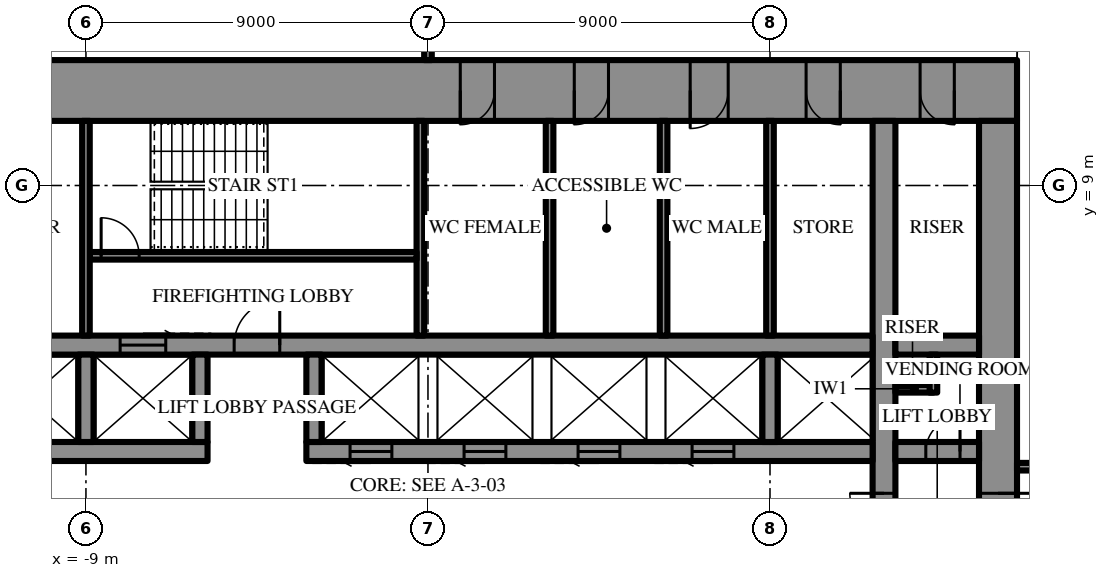
"""IFC4 building model, lengths in metres.
Left out: names, types, materials, properties, quantities, classifications, styles, units other than length and angle.
Written with IfcOpenShell. Run it as: python <this file> out.ifc"""

import sys

from ifc_helpers import new_model, si_unit, direction, frame, frame_2d, origin, place, context, subcontext, project, spatial, rectangle, extrude, element, fill, save


model = new_model("IFC4")
c1 = context("Model", 3, precision=1e-05, world=origin(), true_north=direction((0.0, 1.0)))
c2 = subcontext(c1, "Body", "Model", "MODEL_VIEW")
j1 = project(units=[si_unit("LENGTHUNIT", "METRE"), si_unit("PLANEANGLEUNIT", "RADIAN")], contexts=[c1])
p1 = place(None, origin())
s1 = spatial("IfcSite", under=j1, at=p1, CompositionType="ELEMENT")
p2 = place(p1, origin())
s2 = spatial("IfcBuilding", under=s1, at=p2, CompositionType="ELEMENT")
p3 = place(p2, frame((0.0, 0.0, 228.1)))
s3 = spatial("IfcBuildingStorey", under=s2, at=p3, CompositionType="ELEMENT", Elevation=228.1)
p4 = place(p3, frame((-15.5, 11.5, 0.0), z_axis=(0.0, 0.0, 1.0), x_axis=(1.0, 0.0, 0.0)))
e1 = element("IfcWall", 1, at=p4, inside=s3, PredefinedType="SHEAR", context=c2, shape_type="SweptSolid", body=[
    extrude(rectangle(XDim=31.0, YDim=1.6, at=frame_2d((15.5, 0.0))), origin(), (0.0, 0.0, 1.0), 4.2),
])
p5 = place(p4, frame((16.35, 0.0, 0.0)))
e2 = element("IfcOpeningElement", 2, at=p5, cuts=e1, PredefinedType="OPENING", context=c2, shape_type="SweptSolid", body=[
    extrude(rectangle(XDim=0.9, YDim=2.2, at=frame_2d((0.45, 1.1))), frame((0.0, 0.81, 0.0), z_axis=(0.0, -1.0, 0.0), x_axis=(1.0, 0.0, 0.0)), (0.0, 0.0, 1.0), 1.62),
])
p6 = place(p4, frame((19.35, 0.0, 0.0)))
e3 = element("IfcOpeningElement", 3, at=p6, cuts=e1, PredefinedType="OPENING", context=c2, shape_type="SweptSolid", body=[
    extrude(rectangle(XDim=0.9, YDim=2.2, at=frame_2d((0.45, 1.1))), frame((0.0, 0.81, 0.0), z_axis=(0.0, -1.0, 0.0), x_axis=(1.0, 0.0, 0.0)), (0.0, 0.0, 1.0), 1.62),
])
p7 = place(p4, frame((22.4, 0.0, 0.0)))
e4 = element("IfcOpeningElement", 4, at=p7, cuts=e1, PredefinedType="OPENING", context=c2, shape_type="SweptSolid", body=[
    extrude(rectangle(XDim=1.0, YDim=2.2, at=frame_2d((0.5, 1.1))), frame((0.0, 0.81, 0.0), z_axis=(0.0, -1.0, 0.0), x_axis=(1.0, 0.0, 0.0)), (0.0, 0.0, 1.0), 1.62),
])
p8 = place(p4, frame((1.65, 0.0, 0.0)))
e5 = element("IfcOpeningElement", 5, at=p8, cuts=e1, PredefinedType="OPENING", context=c2, shape_type="SweptSolid", body=[
    extrude(rectangle(XDim=0.9, YDim=2.2, at=frame_2d((0.45, 1.1))), frame((0.0, 0.81, 0.0), z_axis=(0.0, -1.0, 0.0), x_axis=(1.0, 0.0, 0.0)), (0.0, 0.0, 1.0), 1.62),
])
p9 = place(p4, frame((4.65, 0.0, 0.0)))
e6 = element("IfcOpeningElement", 6, at=p9, cuts=e1, PredefinedType="OPENING", context=c2, shape_type="SweptSolid", body=[
    extrude(rectangle(XDim=0.9, YDim=2.2, at=frame_2d((0.45, 1.1))), frame((0.0, 0.81, 0.0), z_axis=(0.0, -1.0, 0.0), x_axis=(1.0, 0.0, 0.0)), (0.0, 0.0, 1.0), 1.62),
])
p10 = place(p4, frame((25.45, 0.0, 0.0)))
e7 = element("IfcOpeningElement", 7, at=p10, cuts=e1, PredefinedType="OPENING", context=c2, shape_type="SweptSolid", body=[
    extrude(rectangle(XDim=0.9, YDim=2.2, at=frame_2d((0.45, 1.1))), frame((0.0, 0.81, 0.0), z_axis=(0.0, -1.0, 0.0), x_axis=(1.0, 0.0, 0.0)), (0.0, 0.0, 1.0), 1.62),
])
p11 = place(p4, frame((28.45, 0.0, 0.0)))
e8 = element("IfcOpeningElement", 8, at=p11, cuts=e1, PredefinedType="OPENING", context=c2, shape_type="SweptSolid", body=[
    extrude(rectangle(XDim=0.9, YDim=2.2, at=frame_2d((0.45, 1.1))), frame((0.0, 0.81, 0.0), z_axis=(0.0, -1.0, 0.0), x_axis=(1.0, 0.0, 0.0)), (0.0, 0.0, 1.0), 1.62),
])
p12 = place(p3, frame((15.0, -10.7, 0.0), z_axis=(0.0, 0.0, 1.0), x_axis=(0.0, 1.0, 0.0)))
e9 = element("IfcWall", 9, at=p12, inside=s3, PredefinedType="SHEAR", context=c2, shape_type="SweptSolid", body=[
    extrude(rectangle(XDim=21.4, YDim=1.0, at=frame_2d((10.7, 0.0))), origin(), (0.0, 0.0, 1.0), 4.2),
])
p13 = place(p12, frame((9.8, 0.0, 0.0)))
e10 = element("IfcOpeningElement", 10, at=p13, cuts=e9, PredefinedType="OPENING", context=c2, shape_type="SweptSolid", body=[
    extrude(rectangle(XDim=1.8, YDim=2.4, at=frame_2d((0.9, 1.2))), frame((0.0, 0.51, 0.0), z_axis=(0.0, -1.0, 0.0), x_axis=(1.0, 0.0, 0.0)), (0.0, 0.0, 1.0), 1.02),
])
p14 = place(p3, frame((12.0, -10.7, 0.0), z_axis=(0.0, 0.0, 1.0), x_axis=(0.0, 1.0, 0.0)))
e11 = element("IfcWall", 11, at=p14, inside=s3, PredefinedType="SHEAR", context=c2, shape_type="SweptSolid", body=[
    extrude(rectangle(XDim=21.4, YDim=0.6, at=frame_2d((10.7, 0.0))), origin(), (0.0, 0.0, 1.0), 4.2),
])
p15 = place(p14, frame((9.8, 0.0, 0.0)))
e12 = element("IfcOpeningElement", 12, at=p15, cuts=e11, PredefinedType="OPENING", context=c2, shape_type="SweptSolid", body=[
    extrude(rectangle(XDim=1.8, YDim=2.4, at=frame_2d((0.9, 1.2))), frame((0.0, 0.31, 0.0), z_axis=(0.0, -1.0, 0.0), x_axis=(1.0, 0.0, 0.0)), (0.0, 0.0, 1.0), 0.62),
])
p16 = place(p3, frame((-11.7, 2.0, 0.0), z_axis=(0.0, 0.0, 1.0), x_axis=(1.0, 0.0, 0.0)))
e13 = element("IfcWall", 13, at=p16, inside=s3, PredefinedType="SHEAR", context=c2, shape_type="SweptSolid", body=[
    extrude(rectangle(XDim=5.9, YDim=0.5, at=frame_2d((2.95, 0.0))), origin(), (0.0, 0.0, 1.0), 4.2),
])
p17 = place(p3, frame((-3.2, 2.0, 0.0), z_axis=(0.0, 0.0, 1.0), x_axis=(1.0, 0.0, 0.0)))
e14 = element("IfcWall", 14, at=p17, inside=s3, PredefinedType="SHEAR", context=c2, shape_type="SweptSolid", body=[
    extrude(rectangle(XDim=14.9, YDim=0.5, at=frame_2d((7.45, 0.0))), origin(), (0.0, 0.0, 1.0), 4.2),
])
p18 = place(p17, frame((1.15, 0.0, 0.0)))
e15 = element("IfcOpeningElement", 15, at=p18, cuts=e14, PredefinedType="OPENING", context=c2, shape_type="SweptSolid", body=[
    extrude(rectangle(XDim=1.1, YDim=2.2, at=frame_2d((0.55, 1.1))), frame((0.0, 0.26, 0.0), z_axis=(0.0, -1.0, 0.0), x_axis=(1.0, 0.0, 0.0)), (0.0, 0.0, 1.0), 0.52),
])
p19 = place(p17, frame((4.15, 0.0, 0.0)))
e16 = element("IfcOpeningElement", 16, at=p19, cuts=e14, PredefinedType="OPENING", context=c2, shape_type="SweptSolid", body=[
    extrude(rectangle(XDim=1.1, YDim=2.2, at=frame_2d((0.55, 1.1))), frame((0.0, 0.26, 0.0), z_axis=(0.0, -1.0, 0.0), x_axis=(1.0, 0.0, 0.0)), (0.0, 0.0, 1.0), 0.52),
])
p20 = place(p17, frame((7.15, 0.0, 0.0)))
e17 = element("IfcOpeningElement", 17, at=p20, cuts=e14, PredefinedType="OPENING", context=c2, shape_type="SweptSolid", body=[
    extrude(rectangle(XDim=1.1, YDim=2.2, at=frame_2d((0.55, 1.1))), frame((0.0, 0.26, 0.0), z_axis=(0.0, -1.0, 0.0), x_axis=(1.0, 0.0, 0.0)), (0.0, 0.0, 1.0), 0.52),
])
p21 = place(p17, frame((10.15, 0.0, 0.0)))
e18 = element("IfcOpeningElement", 18, at=p21, cuts=e14, PredefinedType="OPENING", context=c2, shape_type="SweptSolid", body=[
    extrude(rectangle(XDim=1.1, YDim=2.2, at=frame_2d((0.55, 1.1))), frame((0.0, 0.26, 0.0), z_axis=(0.0, -1.0, 0.0), x_axis=(1.0, 0.0, 0.0)), (0.0, 0.0, 1.0), 0.52),
])
p22 = place(p3, frame((12.3, 2.0, 0.0), z_axis=(0.0, 0.0, 1.0), x_axis=(1.0, 0.0, 0.0)))
e19 = element("IfcWall", 19, at=p22, inside=s3, PredefinedType="SHEAR", context=c2, shape_type="SweptSolid", body=[
    extrude(rectangle(XDim=2.2, YDim=0.5, at=frame_2d((1.1, 0.0))), origin(), (0.0, 0.0, 1.0), 4.2),
])
p23 = place(p22, frame((0.8, 0.0, 0.0)))
e20 = element("IfcOpeningElement", 20, at=p23, cuts=e19, PredefinedType="OPENING", context=c2, shape_type="SweptSolid", body=[
    extrude(rectangle(XDim=0.9, YDim=2.2, at=frame_2d((0.45, 1.1))), frame((0.0, 0.26, 0.0), z_axis=(0.0, -1.0, 0.0), x_axis=(1.0, 0.0, 0.0)), (0.0, 0.0, 1.0), 0.52),
])
p24 = place(p3, frame((-11.7, 4.8, 0.0), z_axis=(0.0, 0.0, 1.0), x_axis=(1.0, 0.0, 0.0)))
e21 = element("IfcWall", 21, at=p24, inside=s3, PredefinedType="SHEAR", context=c2, shape_type="SweptSolid", body=[
    extrude(rectangle(XDim=23.4, YDim=0.5, at=frame_2d((11.7, 0.0))), origin(), (0.0, 0.0, 1.0), 4.2),
])
p25 = place(p24, frame((6.6, 0.0, 0.0)))
e22 = element("IfcOpeningElement", 22, at=p25, cuts=e21, PredefinedType="OPENING", context=c2, shape_type="SweptSolid", body=[
    extrude(rectangle(XDim=1.2, YDim=2.2, at=frame_2d((0.6, 1.1))), frame((0.0, 0.26, 0.0), z_axis=(0.0, -1.0, 0.0), x_axis=(1.0, 0.0, 0.0)), (0.0, 0.0, 1.0), 0.52),
])
p26 = place(p24, frame((3.6, 0.0, 0.0)))
e23 = element("IfcOpeningElement", 23, at=p26, cuts=e21, PredefinedType="OPENING", context=c2, shape_type="SweptSolid", body=[
    extrude(rectangle(XDim=1.2, YDim=2.2, at=frame_2d((0.6, 1.1))), frame((0.0, 0.26, 0.0), z_axis=(0.0, -1.0, 0.0), x_axis=(1.0, 0.0, 0.0)), (0.0, 0.0, 1.0), 0.52),
])
p27 = place(p3, frame((12.3, 4.8, 0.0), z_axis=(0.0, 0.0, 1.0), x_axis=(1.0, 0.0, 0.0)))
e24 = element("IfcWall", 24, at=p27, inside=s3, PredefinedType="SHEAR", context=c2, shape_type="SweptSolid", body=[
    extrude(rectangle(XDim=2.2, YDim=0.5, at=frame_2d((1.1, 0.0))), origin(), (0.0, 0.0, 1.0), 4.2),
])
for number, where, z_axis, x_axis in (
    (25, (-9.0, 2.25, 0.0), (0.0, 0.0, 1.0), (0.0, 1.0, 0.0)),
    (26, (-6.0, 2.25, 0.0), (0.0, 0.0, 1.0), (0.0, 1.0, 0.0)),
    (27, (-3.0, 2.25, 0.0), (0.0, 0.0, 1.0), (0.0, 1.0, 0.0)),
    (28, (9.0, 2.25, 0.0), (0.0, 0.0, 1.0), (0.0, 1.0, 0.0)),
):
    element("IfcWall", number, at=place(p3, frame(where, z_axis=z_axis, x_axis=x_axis)), inside=s3, PredefinedType="SHEAR", context=c2, shape_type="SweptSolid", body=[
        extrude(rectangle(XDim=2.3, YDim=0.4, at=frame_2d((1.15, 0.0))), origin(), (0.0, 0.0, 1.0), 4.2),
    ])
p28 = place(p3, frame((-0.2, 5.05, 0.0), z_axis=(0.0, 0.0, 1.0), x_axis=(0.0, 1.0, 0.0)))
e29 = element("IfcWall", 29, at=p28, inside=s3, PredefinedType="SHEAR", context=c2, shape_type="SweptSolid", body=[
    extrude(rectangle(XDim=5.65, YDim=0.2, at=frame_2d((2.825, 0.0))), origin(), (0.0, 0.0, 1.0), 4.2),
])
p29 = place(p3, frame((-8.9, 7.15, 0.0), z_axis=(0.0, 0.0, 1.0), x_axis=(1.0, 0.0, 0.0)))
e30 = element("IfcWall", 30, at=p29, inside=s3, PredefinedType="SHEAR", context=c2, shape_type="SweptSolid", body=[
    extrude(rectangle(XDim=8.6, YDim=0.2, at=frame_2d((4.3, 0.0))), origin(), (0.0, 0.0, 1.0), 4.2),
])
p30 = place(p29, frame((0.3, 0.0, 0.0)))
e31 = element("IfcOpeningElement", 31, at=p30, cuts=e30, PredefinedType="OPENING", context=c2, shape_type="SweptSolid", body=[
    extrude(rectangle(XDim=1.0, YDim=2.2, at=frame_2d((0.5, 1.1))), frame((0.0, 0.11, 0.0), z_axis=(0.0, -1.0, 0.0), x_axis=(1.0, 0.0, 0.0)), (0.0, 0.0, 1.0), 0.22),
])
for number, where, z_axis, x_axis in (
    (32, (-9.0, 5.05, 0.0), (0.0, 0.0, 1.0), (0.0, 1.0, 0.0)),
    (33, (9.0, 5.05, 0.0), (0.0, 0.0, 1.0), (0.0, 1.0, 0.0)),
    (34, (3.2, 5.05, 0.0), (0.0, 0.0, 1.0), (0.0, 1.0, 0.0)),
    (35, (6.2, 5.05, 0.0), (0.0, 0.0, 1.0), (0.0, 1.0, 0.0)),
):
    element("IfcWall", number, at=place(p3, frame(where, z_axis=z_axis, x_axis=x_axis)), inside=s3, PredefinedType="PARTITIONING", context=c2, shape_type="SweptSolid", body=[
        extrude(rectangle(XDim=5.65, YDim=0.2, at=frame_2d((2.825, 0.0))), origin(), (0.0, 0.0, 1.0), 4.0),
    ])
for number, where, z_axis, x_axis in (
    (36, (12.3, 3.65, 0.0), (0.0, 0.0, 1.0), (1.0, 0.0, 0.0)),
    (37, (13.3, 3.55, 0.0), (0.0, 0.0, 1.0), (0.0, 1.0, 0.0)),
):
    element("IfcWall", number, at=place(p3, frame(where, z_axis=z_axis, x_axis=x_axis)), inside=s3, PredefinedType="PARTITIONING", context=c2, shape_type="SweptSolid", body=[
        extrude(rectangle(XDim=1.0, YDim=0.2, at=frame_2d((0.5, 0.0))), origin(), (0.0, 0.0, 1.0), 4.0),
    ])
p31 = place(p3, frame((15.5, 1.6, 0.0), z_axis=(0.0, 0.0, 1.0), x_axis=(1.0, 0.0, 0.0)))
e38 = element("IfcWall", 38, at=p31, inside=s3, PredefinedType="PARTITIONING", context=c2, shape_type="SweptSolid", body=[
    extrude(rectangle(XDim=2.3, YDim=0.2, at=frame_2d((1.15, 0.0))), origin(), (0.0, 0.0, 1.0), 4.0),
])
p32 = place(p3, frame((0.0, 12.3, 0.0), z_axis=(0.0, 0.0, 1.0), x_axis=(0.0, 1.0, 0.0)))
e39 = element("IfcWall", 39, at=p32, inside=s3, PredefinedType="PARTITIONING", context=c2, shape_type="SweptSolid", body=[
    extrude(rectangle(XDim=1.7, YDim=0.2, at=frame_2d((0.85, 0.0))), origin(), (0.0, 0.0, 1.0), 2.992),
])
p33 = place(p32, frame((0.35, 0.0, 0.0)))
e40 = element("IfcOpeningElement", 40, at=p33, cuts=e39, PredefinedType="OPENING", context=c2, shape_type="SweptSolid", body=[
    extrude(rectangle(XDim=1.0, YDim=2.2, at=frame_2d((0.5, 1.1))), frame((0.0, 0.11, 0.0), z_axis=(0.0, -1.0, 0.0), x_axis=(1.0, 0.0, 0.0)), (0.0, 0.0, 1.0), 0.22),
])
p34 = place(p13, frame((1.8, 0.0, 0.0), z_axis=(0.0, 0.0, 1.0), x_axis=(-1.0, 0.0, 0.0)))
e41 = element("IfcDoor", 41, at=p34, inside=s3, OperationType="DOUBLE_DOOR_SINGLE_SWING", PredefinedType="DOOR", context=c2, shape_type="SweptSolid", body=[
    extrude(rectangle(XDim=1.8, YDim=2.4, at=frame_2d((0.9, 1.2))), frame((0.0, 0.025, 0.0), z_axis=(0.0, -1.0, 0.0), x_axis=(1.0, 0.0, 0.0)), (0.0, 0.0, 1.0), 0.05),
])
fill(e10, e41)
p35 = place(p25, origin())
e42 = element("IfcDoor", 42, at=p35, inside=s3, OperationType="SINGLE_SWING_LEFT", PredefinedType="DOOR", context=c2, shape_type="SweptSolid", body=[
    extrude(rectangle(XDim=1.2, YDim=2.2, at=frame_2d((0.6, 1.1))), frame((0.0, 0.025, 0.0), z_axis=(0.0, -1.0, 0.0), x_axis=(1.0, 0.0, 0.0)), (0.0, 0.0, 1.0), 0.05),
])
fill(e22, e42)
p36 = place(p30, origin())
e43 = element("IfcDoor", 43, at=p36, inside=s3, OperationType="SINGLE_SWING_RIGHT", PredefinedType="DOOR", context=c2, shape_type="SweptSolid", body=[
    extrude(rectangle(XDim=1.0, YDim=2.2, at=frame_2d((0.5, 1.1))), frame((0.0, 0.025, 0.0), z_axis=(0.0, -1.0, 0.0), x_axis=(1.0, 0.0, 0.0)), (0.0, 0.0, 1.0), 0.05),
])
fill(e31, e43)
p37 = place(p5, frame((0.9, 0.0, 0.0), z_axis=(0.0, 0.0, 1.0), x_axis=(-1.0, 0.0, 0.0)))
e44 = element("IfcDoor", 44, at=p37, inside=s3, OperationType="SINGLE_SWING_LEFT", PredefinedType="DOOR", context=c2, shape_type="SweptSolid", body=[
    extrude(rectangle(XDim=0.9, YDim=2.2, at=frame_2d((0.45, 1.1))), frame((0.0, 0.025, 0.0), z_axis=(0.0, -1.0, 0.0), x_axis=(1.0, 0.0, 0.0)), (0.0, 0.0, 1.0), 0.05),
])
fill(e2, e44)
p38 = place(p6, frame((0.9, 0.0, 0.0), z_axis=(0.0, 0.0, 1.0), x_axis=(-1.0, 0.0, 0.0)))
e45 = element("IfcDoor", 45, at=p38, inside=s3, OperationType="SINGLE_SWING_LEFT", PredefinedType="DOOR", context=c2, shape_type="SweptSolid", body=[
    extrude(rectangle(XDim=0.9, YDim=2.2, at=frame_2d((0.45, 1.1))), frame((0.0, 0.025, 0.0), z_axis=(0.0, -1.0, 0.0), x_axis=(1.0, 0.0, 0.0)), (0.0, 0.0, 1.0), 0.05),
])
fill(e3, e45)
p39 = place(p7, frame((1.0, 0.0, 0.0), z_axis=(0.0, 0.0, 1.0), x_axis=(-1.0, 0.0, 0.0)))
e46 = element("IfcDoor", 46, at=p39, inside=s3, OperationType="SINGLE_SWING_LEFT", PredefinedType="DOOR", context=c2, shape_type="SweptSolid", body=[
    extrude(rectangle(XDim=1.0, YDim=2.2, at=frame_2d((0.5, 1.1))), frame((0.0, 0.025, 0.0), z_axis=(0.0, -1.0, 0.0), x_axis=(1.0, 0.0, 0.0)), (0.0, 0.0, 1.0), 0.05),
])
fill(e4, e46)
p40 = place(p10, frame((0.9, 0.0, 0.0), z_axis=(0.0, 0.0, 1.0), x_axis=(-1.0, 0.0, 0.0)))
e47 = element("IfcDoor", 47, at=p40, inside=s3, OperationType="SINGLE_SWING_RIGHT", PredefinedType="DOOR", context=c2, shape_type="SweptSolid", body=[
    extrude(rectangle(XDim=0.9, YDim=2.2, at=frame_2d((0.45, 1.1))), frame((0.0, 0.025, 0.0), z_axis=(0.0, -1.0, 0.0), x_axis=(1.0, 0.0, 0.0)), (0.0, 0.0, 1.0), 0.05),
])
fill(e7, e47)
p41 = place(p11, frame((0.9, 0.0, 0.0), z_axis=(0.0, 0.0, 1.0), x_axis=(-1.0, 0.0, 0.0)))
e48 = element("IfcDoor", 48, at=p41, inside=s3, OperationType="SINGLE_SWING_RIGHT", PredefinedType="DOOR", context=c2, shape_type="SweptSolid", body=[
    extrude(rectangle(XDim=0.9, YDim=2.2, at=frame_2d((0.45, 1.1))), frame((0.0, 0.025, 0.0), z_axis=(0.0, -1.0, 0.0), x_axis=(1.0, 0.0, 0.0)), (0.0, 0.0, 1.0), 0.05),
])
fill(e8, e48)
p42 = place(p23, origin())
e49 = element("IfcDoor", 49, at=p42, inside=s3, OperationType="SINGLE_SWING_LEFT", PredefinedType="DOOR", context=c2, shape_type="SweptSolid", body=[
    extrude(rectangle(XDim=0.9, YDim=2.2, at=frame_2d((0.45, 1.1))), frame((0.0, 0.025, 0.0), z_axis=(0.0, -1.0, 0.0), x_axis=(1.0, 0.0, 0.0)), (0.0, 0.0, 1.0), 0.05),
])
fill(e20, e49)
p43 = place(p15, origin())
e50 = element("IfcDoor", 50, at=p43, inside=s3, OperationType="DOUBLE_DOOR_SINGLE_SWING", PredefinedType="DOOR", context=c2, shape_type="SweptSolid", body=[
    extrude(rectangle(XDim=1.8, YDim=2.4, at=frame_2d((0.9, 1.2))), frame((0.0, 0.025, 0.0), z_axis=(0.0, -1.0, 0.0), x_axis=(1.0, 0.0, 0.0)), (0.0, 0.0, 1.0), 0.05),
])
fill(e12, e50)
p44 = place(p26, origin())
e51 = element("IfcDoor", 51, at=p44, inside=s3, OperationType="SLIDING_TO_LEFT", PredefinedType="DOOR", context=c2, shape_type="SweptSolid", body=[
    extrude(rectangle(XDim=1.2, YDim=2.2, at=frame_2d((0.6, 1.1))), frame((0.0, 0.025, 0.0), z_axis=(0.0, -1.0, 0.0), x_axis=(1.0, 0.0, 0.0)), (0.0, 0.0, 1.0), 0.05),
])
fill(e23, e51)
p45 = place(p18, frame((1.1, 0.0, 0.0), z_axis=(0.0, 0.0, 1.0), x_axis=(-1.0, 0.0, 0.0)))
e52 = element("IfcDoor", 52, at=p45, inside=s3, OperationType="SLIDING_TO_LEFT", PredefinedType="DOOR", context=c2, shape_type="SweptSolid", body=[
    extrude(rectangle(XDim=1.1, YDim=2.2, at=frame_2d((0.55, 1.1))), frame((0.0, 0.025, 0.0), z_axis=(0.0, -1.0, 0.0), x_axis=(1.0, 0.0, 0.0)), (0.0, 0.0, 1.0), 0.05),
])
fill(e15, e52)
p46 = place(p19, frame((1.1, 0.0, 0.0), z_axis=(0.0, 0.0, 1.0), x_axis=(-1.0, 0.0, 0.0)))
e53 = element("IfcDoor", 53, at=p46, inside=s3, OperationType="SLIDING_TO_LEFT", PredefinedType="DOOR", context=c2, shape_type="SweptSolid", body=[
    extrude(rectangle(XDim=1.1, YDim=2.2, at=frame_2d((0.55, 1.1))), frame((0.0, 0.025, 0.0), z_axis=(0.0, -1.0, 0.0), x_axis=(1.0, 0.0, 0.0)), (0.0, 0.0, 1.0), 0.05),
])
fill(e16, e53)
p47 = place(p20, frame((1.1, 0.0, 0.0), z_axis=(0.0, 0.0, 1.0), x_axis=(-1.0, 0.0, 0.0)))
e54 = element("IfcDoor", 54, at=p47, inside=s3, OperationType="SLIDING_TO_LEFT", PredefinedType="DOOR", context=c2, shape_type="SweptSolid", body=[
    extrude(rectangle(XDim=1.1, YDim=2.2, at=frame_2d((0.55, 1.1))), frame((0.0, 0.025, 0.0), z_axis=(0.0, -1.0, 0.0), x_axis=(1.0, 0.0, 0.0)), (0.0, 0.0, 1.0), 0.05),
])
fill(e17, e54)
p48 = place(p21, frame((1.1, 0.0, 0.0), z_axis=(0.0, 0.0, 1.0), x_axis=(-1.0, 0.0, 0.0)))
e55 = element("IfcDoor", 55, at=p48, inside=s3, OperationType="SLIDING_TO_LEFT", PredefinedType="DOOR", context=c2, shape_type="SweptSolid", body=[
    extrude(rectangle(XDim=1.1, YDim=2.2, at=frame_2d((0.55, 1.1))), frame((0.0, 0.025, 0.0), z_axis=(0.0, -1.0, 0.0), x_axis=(1.0, 0.0, 0.0)), (0.0, 0.0, 1.0), 0.05),
])
fill(e18, e55)
save(model, sys.argv[1])
